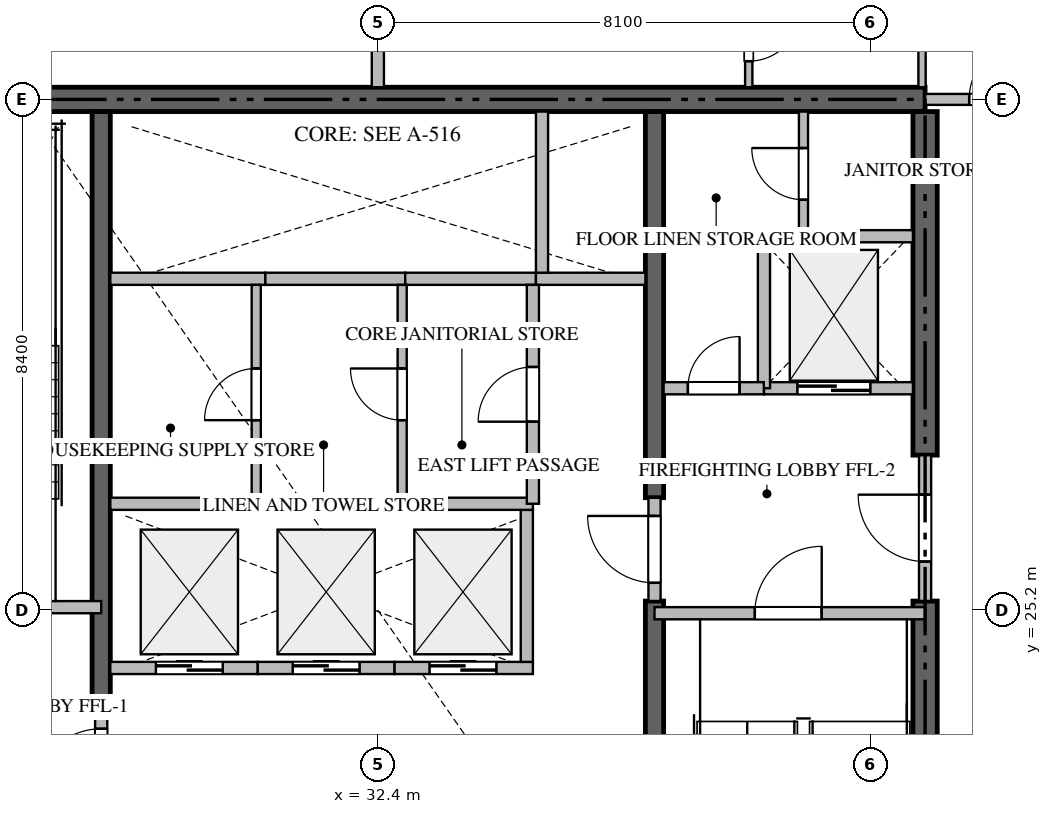
"""IFC4 building model, lengths in metres.
Left out: names, types, materials, properties, quantities, classifications, styles, units other than length and angle.
Written with IfcOpenShell. Run it as: python <this file> out.ifc"""

import sys

from ifc_helpers import new_model, si_unit, direction, frame, frame_2d, origin, place, context, subcontext, project, spatial, rectangle, extrude, source, transform, mapped, element, fill, save


model = new_model("IFC4")
c1 = context("Model", 3, precision=1e-05, world=origin(), true_north=direction((0.0, 1.0)))
c2 = subcontext(c1, "Body", "Model", "MODEL_VIEW")
j1 = project(units=[si_unit("LENGTHUNIT", "METRE"), si_unit("PLANEANGLEUNIT", "RADIAN")], contexts=[c1])
p1 = place(None, origin())
s1 = spatial("IfcSite", under=j1, at=p1, CompositionType="ELEMENT")
p2 = place(p1, origin())
s2 = spatial("IfcBuilding", under=s1, at=p2, CompositionType="ELEMENT")
p3 = place(p2, frame((0.0, 0.0, 120.15)))
s3 = spatial("IfcBuildingStorey", under=s2, at=p3, CompositionType="ELEMENT", Elevation=120.15)
p4 = place(p3, frame((41.4, 33.6, -0.44), z_axis=(0.0, 0.0, 1.0), x_axis=(-1.0, 0.0, 0.0)))
e1 = element("IfcWall", 1, at=p4, inside=s3, PredefinedType="SHEAR", context=c2, shape_type="SweptSolid", body=[
    extrude(rectangle(XDim=18.0, YDim=0.4, at=frame_2d((9.0, 0.0))), origin(), (0.0, 0.0, 1.0), 3.928),
])
p5 = place(p3, frame((41.4, 17.0, -0.44), z_axis=(0.0, 0.0, 1.0), x_axis=(0.0, 1.0, 0.0)))
e2 = element("IfcWall", 2, at=p5, inside=s3, PredefinedType="SHEAR", context=c2, shape_type="SweptSolid", body=[
    extrude(rectangle(XDim=8.35, YDim=0.4, at=frame_2d((4.175, 0.0))), origin(), (0.0, 0.0, 1.0), 3.928),
])
p6 = place(p3, frame((41.4, 27.75, -0.44), z_axis=(0.0, 0.0, 1.0), x_axis=(0.0, 1.0, 0.0)))
e3 = element("IfcWall", 3, at=p6, inside=s3, PredefinedType="SHEAR", context=c2, shape_type="SweptSolid", body=[
    extrude(rectangle(XDim=5.65, YDim=0.4, at=frame_2d((2.825, 0.0))), origin(), (0.0, 0.0, 1.0), 3.928),
])
p7 = place(p3, frame((27.85, 23.55, -0.44), z_axis=(0.0, 0.0, 1.0), x_axis=(0.0, 1.0, 0.0)))
e4 = element("IfcWall", 4, at=p7, inside=s3, PredefinedType="SHEAR", context=c2, shape_type="SweptSolid", body=[
    extrude(rectangle(XDim=9.85, YDim=0.3, at=frame_2d((4.925, 0.0))), origin(), (0.0, 0.0, 1.0), 3.928),
])
p8 = place(p3, frame((36.95, 17.0, -0.44), z_axis=(0.0, 0.0, 1.0), x_axis=(0.0, 1.0, 0.0)))
e5 = element("IfcWall", 5, at=p8, inside=s3, PredefinedType="SHEAR", context=c2, shape_type="SweptSolid", body=[
    extrude(rectangle(XDim=8.35, YDim=0.3, at=frame_2d((4.175, 0.0))), origin(), (0.0, 0.0, 1.0), 3.928),
])
p9 = place(p3, frame((36.95, 27.05, -0.44), z_axis=(0.0, 0.0, 1.0), x_axis=(0.0, 1.0, 0.0)))
e6 = element("IfcWall", 6, at=p9, inside=s3, PredefinedType="SHEAR", context=c2, shape_type="SweptSolid", body=[
    extrude(rectangle(XDim=6.35, YDim=0.3, at=frame_2d((3.175, 0.0))), origin(), (0.0, 0.0, 1.0), 3.928),
])
p10 = place(p3, frame((23.4, 25.25, 0.0), z_axis=(0.0, 0.0, 1.0), x_axis=(1.0, 0.0, 0.0)))
e7 = element("IfcWall", 7, at=p10, inside=s3, PredefinedType="STANDARD", context=c2, shape_type="SweptSolid", body=[
    extrude(rectangle(XDim=4.45, YDim=0.2, at=frame_2d((2.225, 0.0))), origin(), (0.0, 0.0, 1.0), 3.49),
])
p11 = place(p10, frame((1.65, 0.0, 0.0)))
e8 = element("IfcOpeningElement", 8, at=p11, cuts=e7, PredefinedType="OPENING", context=c2, shape_type="SweptSolid", body=[
    extrude(rectangle(XDim=1.1, YDim=2.15, at=frame_2d((0.55, 1.075))), frame((0.0, 0.11, 0.0), z_axis=(0.0, -1.0, 0.0), x_axis=(1.0, 0.0, 0.0)), (0.0, 0.0, 1.0), 0.22),
])
p12 = place(p3, frame((36.95, 25.15, 0.0), z_axis=(0.0, 0.0, 1.0), x_axis=(1.0, 0.0, 0.0)))
e9 = element("IfcWall", 9, at=p12, inside=s3, PredefinedType="STANDARD", context=c2, shape_type="SweptSolid", body=[
    extrude(rectangle(XDim=4.45, YDim=0.2, at=frame_2d((2.225, 0.0))), origin(), (0.0, 0.0, 1.0), 3.49),
])
p13 = place(p12, frame((1.65, 0.0, 0.0)))
e10 = element("IfcOpeningElement", 10, at=p13, cuts=e9, PredefinedType="OPENING", context=c2, shape_type="SweptSolid", body=[
    extrude(rectangle(XDim=1.1, YDim=2.15, at=frame_2d((0.55, 1.075))), frame((0.0, 0.11, 0.0), z_axis=(0.0, -1.0, 0.0), x_axis=(1.0, 0.0, 0.0)), (0.0, 0.0, 1.0), 0.22),
])
p14 = place(p3, frame((38.75, 28.85, 0.0), z_axis=(0.0, 0.0, 1.0), x_axis=(1.0, 0.0, 0.0)))
e11 = element("IfcWall", 11, at=p14, inside=s3, PredefinedType="STANDARD", context=c2, shape_type="SweptSolid", body=[
    extrude(rectangle(XDim=2.45, YDim=0.2, at=frame_2d((1.225, 0.0))), origin(), (0.0, 0.0, 1.0), 3.49),
])
p15 = place(p14, frame((0.55, 0.0, 0.0)))
e12 = element("IfcOpeningElement", 12, at=p15, cuts=e11, PredefinedType="OPENING", context=c2, shape_type="SweptSolid", body=[
    extrude(rectangle(XDim=1.2, YDim=2.2, at=frame_2d((0.6, 1.1))), frame((0.0, 0.11, 0.0), z_axis=(0.0, -1.0, 0.0), x_axis=(1.0, 0.0, 0.0)), (0.0, 0.0, 1.0), 0.22),
])
p16 = place(p3, frame((28.0, 24.25, 0.0), z_axis=(0.0, 0.0, 1.0), x_axis=(1.0, 0.0, 0.0)))
e13 = element("IfcWall", 13, at=p16, inside=s3, PredefinedType="STANDARD", context=c2, shape_type="SweptSolid", body=[
    extrude(rectangle(XDim=2.425, YDim=0.2, at=frame_2d((1.212, 0.0))), origin(), (0.0, 0.0, 1.0), 3.49),
])
p17 = place(p16, frame((0.75, 0.0, 0.0)))
e14 = element("IfcOpeningElement", 14, at=p17, cuts=e13, PredefinedType="OPENING", context=c2, shape_type="SweptSolid", body=[
    extrude(rectangle(XDim=1.1, YDim=2.2, at=frame_2d((0.55, 1.1))), frame((0.0, 0.11, 0.0), z_axis=(0.0, -1.0, 0.0), x_axis=(1.0, 0.0, 0.0)), (0.0, 0.0, 1.0), 0.22),
])
p18 = place(p3, frame((30.425, 24.25, 0.0), z_axis=(0.0, 0.0, 1.0), x_axis=(1.0, 0.0, 0.0)))
e15 = element("IfcWall", 15, at=p18, inside=s3, PredefinedType="STANDARD", context=c2, shape_type="SweptSolid", body=[
    extrude(rectangle(XDim=2.25, YDim=0.2, at=frame_2d((1.125, 0.0))), origin(), (0.0, 0.0, 1.0), 3.49),
])
p19 = place(p18, frame((0.575, 0.0, 0.0)))
e16 = element("IfcOpeningElement", 16, at=p19, cuts=e15, PredefinedType="OPENING", context=c2, shape_type="SweptSolid", body=[
    extrude(rectangle(XDim=1.1, YDim=2.2, at=frame_2d((0.55, 1.1))), frame((0.0, 0.11, 0.0), z_axis=(0.0, -1.0, 0.0), x_axis=(1.0, 0.0, 0.0)), (0.0, 0.0, 1.0), 0.22),
])
p20 = place(p3, frame((32.675, 24.25, 0.0), z_axis=(0.0, 0.0, 1.0), x_axis=(1.0, 0.0, 0.0)))
e17 = element("IfcWall", 17, at=p20, inside=s3, PredefinedType="STANDARD", context=c2, shape_type="SweptSolid", body=[
    extrude(rectangle(XDim=2.275, YDim=0.2, at=frame_2d((1.137, 0.0))), origin(), (0.0, 0.0, 1.0), 3.49),
])
p21 = place(p20, frame((0.575, 0.0, 0.0)))
e18 = element("IfcOpeningElement", 18, at=p21, cuts=e17, PredefinedType="OPENING", context=c2, shape_type="SweptSolid", body=[
    extrude(rectangle(XDim=1.1, YDim=2.2, at=frame_2d((0.55, 1.1))), frame((0.0, 0.11, 0.0), z_axis=(0.0, -1.0, 0.0), x_axis=(1.0, 0.0, 0.0)), (0.0, 0.0, 1.0), 0.22),
])
p22 = place(p3, frame((34.85, 24.35, 0.0), z_axis=(0.0, 0.0, 1.0), x_axis=(0.0, 1.0, 0.0)))
e19 = element("IfcWall", 19, at=p22, inside=s3, PredefinedType="STANDARD", context=c2, shape_type="SweptSolid", body=[
    extrude(rectangle(XDim=2.5, YDim=0.2, at=frame_2d((1.25, 0.0))), origin(), (0.0, 0.0, 1.0), 3.49),
])
p23 = place(p3, frame((28.0, 30.65, 0.0), z_axis=(0.0, 0.0, 1.0), x_axis=(1.0, 0.0, 0.0)))
e20 = element("IfcWall", 20, at=p23, inside=s3, PredefinedType="STANDARD", context=c2, shape_type="SweptSolid", body=[
    extrude(rectangle(XDim=2.55, YDim=0.2, at=frame_2d((1.275, 0.0))), origin(), (0.0, 0.0, 1.0), 3.49),
])
p24 = place(p3, frame((30.55, 30.65, 0.0), z_axis=(0.0, 0.0, 1.0), x_axis=(1.0, 0.0, 0.0)))
e21 = element("IfcWall", 21, at=p24, inside=s3, PredefinedType="STANDARD", context=c2, shape_type="SweptSolid", body=[
    extrude(rectangle(XDim=2.3, YDim=0.2, at=frame_2d((1.15, 0.0))), origin(), (0.0, 0.0, 1.0), 3.49),
])
p25 = place(p3, frame((32.85, 30.65, 0.0), z_axis=(0.0, 0.0, 1.0), x_axis=(1.0, 0.0, 0.0)))
e22 = element("IfcWall", 22, at=p25, inside=s3, PredefinedType="STANDARD", context=c2, shape_type="SweptSolid", body=[
    extrude(rectangle(XDim=2.15, YDim=0.2, at=frame_2d((1.075, 0.0))), origin(), (0.0, 0.0, 1.0), 3.49),
])
p26 = place(p3, frame((35.0, 30.65, 0.0), z_axis=(0.0, 0.0, 1.0), x_axis=(1.0, 0.0, 0.0)))
e23 = element("IfcWall", 23, at=p26, inside=s3, PredefinedType="STANDARD", context=c2, shape_type="SweptSolid", body=[
    extrude(rectangle(XDim=1.8, YDim=0.2, at=frame_2d((0.9, 0.0))), origin(), (0.0, 0.0, 1.0), 3.49),
])
p27 = place(p3, frame((35.1, 30.75, 0.0), z_axis=(0.0, 0.0, 1.0), x_axis=(0.0, 1.0, 0.0)))
e24 = element("IfcWall", 24, at=p27, inside=s3, PredefinedType="STANDARD", context=c2, shape_type="SweptSolid", body=[
    extrude(rectangle(XDim=2.65, YDim=0.2, at=frame_2d((1.325, 0.0))), origin(), (0.0, 0.0, 1.0), 3.49),
])
p28 = place(p3, frame((38.75, 28.85, 0.0), z_axis=(0.0, 0.0, 1.0), x_axis=(0.0, 1.0, 0.0)))
e25 = element("IfcWall", 25, at=p28, inside=s3, PredefinedType="STANDARD", context=c2, shape_type="SweptSolid", body=[
    extrude(rectangle(XDim=2.5, YDim=0.2, at=frame_2d((1.25, 0.0))), origin(), (0.0, 0.0, 1.0), 3.49),
])
p29 = place(p3, frame((38.75, 31.35, 0.0), z_axis=(0.0, 0.0, 1.0), x_axis=(1.0, 0.0, 0.0)))
e26 = element("IfcWall", 26, at=p29, inside=s3, PredefinedType="STANDARD", context=c2, shape_type="SweptSolid", body=[
    extrude(rectangle(XDim=2.45, YDim=0.2, at=frame_2d((1.225, 0.0))), origin(), (0.0, 0.0, 1.0), 3.49),
])
p30 = place(p3, frame((37.1, 28.85, 0.0), z_axis=(0.0, 0.0, 1.0), x_axis=(1.0, 0.0, 0.0)))
e27 = element("IfcWall", 27, at=p30, inside=s3, PredefinedType="STANDARD", context=c2, shape_type="SweptSolid", body=[
    extrude(rectangle(XDim=1.648, YDim=0.2, at=frame_2d((0.824, 0.0))), origin(), (0.0, 0.0, 1.0), 3.49),
])
p31 = place(p30, frame((0.399, 0.0, 0.0)))
e28 = element("IfcOpeningElement", 28, at=p31, cuts=e27, PredefinedType="OPENING", context=c2, shape_type="SweptSolid", body=[
    extrude(rectangle(XDim=0.85, YDim=2.1, at=frame_2d((0.425, 1.05))), frame((0.0, 0.11, 0.0), z_axis=(0.0, -1.0, 0.0), x_axis=(1.0, 0.0, 0.0)), (0.0, 0.0, 1.0), 0.22),
])
p32 = place(p3, frame((41.4, 25.352, 0.0), z_axis=(0.0, 0.0, 1.0), x_axis=(0.0, 1.0, 0.0)))
e29 = element("IfcWall", 29, at=p32, inside=s3, PredefinedType="STANDARD", context=c2, shape_type="SweptSolid", body=[
    extrude(rectangle(XDim=2.396, YDim=0.2, at=frame_2d((1.198, 0.0))), origin(), (0.0, 0.0, 1.0), 3.49),
])
p33 = place(p32, frame((0.648, 0.0, 0.0)))
e30 = element("IfcOpeningElement", 30, at=p33, cuts=e29, PredefinedType="OPENING", context=c2, shape_type="SweptSolid", body=[
    extrude(rectangle(XDim=1.1, YDim=2.15, at=frame_2d((0.55, 1.075))), frame((0.0, 0.11, 0.0), z_axis=(0.0, -1.0, 0.0), x_axis=(1.0, 0.0, 0.0)), (0.0, 0.0, 1.0), 0.22),
])
p34 = place(p3, frame((27.85, 21.852, 0.0), z_axis=(0.0, 0.0, 1.0), x_axis=(0.0, 1.0, 0.0)))
e31 = element("IfcWall", 31, at=p34, inside=s3, PredefinedType="STANDARD", context=c2, shape_type="SweptSolid", body=[
    extrude(rectangle(XDim=1.696, YDim=0.2, at=frame_2d((0.848, 0.0))), origin(), (0.0, 0.0, 1.0), 3.49),
])
p35 = place(p34, frame((0.298, 0.0, 0.0)))
e32 = element("IfcOpeningElement", 32, at=p35, cuts=e31, PredefinedType="OPENING", context=c2, shape_type="SweptSolid", body=[
    extrude(rectangle(XDim=1.1, YDim=2.15, at=frame_2d((0.55, 1.075))), frame((0.0, 0.11, 0.0), z_axis=(0.0, -1.0, 0.0), x_axis=(1.0, 0.0, 0.0)), (0.0, 0.0, 1.0), 0.22),
])
p36 = place(p3, frame((36.95, 25.352, 0.0), z_axis=(0.0, 0.0, 1.0), x_axis=(0.0, 1.0, 0.0)))
e33 = element("IfcWall", 33, at=p36, inside=s3, PredefinedType="STANDARD", context=c2, shape_type="SweptSolid", body=[
    extrude(rectangle(XDim=1.696, YDim=0.2, at=frame_2d((0.848, 0.0))), origin(), (0.0, 0.0, 1.0), 3.49),
])
p37 = place(p36, frame((0.298, 0.0, 0.0)))
e34 = element("IfcOpeningElement", 34, at=p37, cuts=e33, PredefinedType="OPENING", context=c2, shape_type="SweptSolid", body=[
    extrude(rectangle(XDim=1.1, YDim=2.15, at=frame_2d((0.55, 1.075))), frame((0.0, 0.11, 0.0), z_axis=(0.0, -1.0, 0.0), x_axis=(1.0, 0.0, 0.0)), (0.0, 0.0, 1.0), 0.22),
])
p38 = place(p3, frame((28.0, 26.95, 0.0), z_axis=(0.0, 0.0, 1.0), x_axis=(1.0, 0.0, 0.0)))
e35 = element("IfcWall", 35, at=p38, inside=s3, PredefinedType="STANDARD", context=c2, shape_type="SweptSolid", body=[
    extrude(rectangle(XDim=6.95, YDim=0.2, at=frame_2d((3.475, 0.0))), origin(), (0.0, 0.0, 1.0), 3.49),
])
p39 = place(p3, frame((39.4, 31.35, 0.0), z_axis=(0.0, 0.0, 1.0), x_axis=(0.0, 1.0, 0.0)))
e36 = element("IfcWall", 36, at=p39, inside=s3, PredefinedType="PARTITIONING", context=c2, shape_type="SweptSolid", body=[
    extrude(rectangle(XDim=2.05, YDim=0.15, at=frame_2d((1.025, 0.0))), origin(), (0.0, 0.0, 1.0), 3.49),
])
p40 = place(p39, frame((0.6, 0.0, 0.0)))
e37 = element("IfcOpeningElement", 37, at=p40, cuts=e36, PredefinedType="OPENING", context=c2, shape_type="SweptSolid", body=[
    extrude(rectangle(XDim=0.85, YDim=2.1, at=frame_2d((0.425, 1.05))), frame((0.0, 0.085, 0.0), z_axis=(0.0, -1.0, 0.0), x_axis=(1.0, 0.0, 0.0)), (0.0, 0.0, 1.0), 0.17),
])
p41 = place(p3, frame((34.95, 26.95, 0.0), z_axis=(0.0, 0.0, 1.0), x_axis=(0.0, 1.0, 0.0)))
e38 = element("IfcWall", 38, at=p41, inside=s3, PredefinedType="STANDARD", context=c2, shape_type="SweptSolid", body=[
    extrude(rectangle(XDim=3.6, YDim=0.2, at=frame_2d((1.8, 0.0))), origin(), (0.0, 0.0, 1.0), 3.49),
])
p42 = place(p41, frame((1.35, 0.0, 0.0)))
e39 = element("IfcOpeningElement", 39, at=p42, cuts=e38, PredefinedType="OPENING", context=c2, shape_type="SweptSolid", body=[
    extrude(rectangle(XDim=0.9, YDim=2.1, at=frame_2d((0.45, 1.05))), frame((0.0, 0.11, 0.0), z_axis=(0.0, -1.0, 0.0), x_axis=(1.0, 0.0, 0.0)), (0.0, 0.0, 1.0), 0.22),
])
p43 = place(p3, frame((32.8, 26.95, 0.0), z_axis=(0.0, 0.0, 1.0), x_axis=(0.0, 1.0, 0.0)))
e40 = element("IfcWall", 40, at=p43, inside=s3, PredefinedType="PARTITIONING", context=c2, shape_type="SweptSolid", body=[
    extrude(rectangle(XDim=3.6, YDim=0.15, at=frame_2d((1.8, 0.0))), origin(), (0.0, 0.0, 1.0), 3.49),
])
p44 = place(p43, frame((1.375, 0.0, 0.0)))
e41 = element("IfcOpeningElement", 41, at=p44, cuts=e40, PredefinedType="OPENING", context=c2, shape_type="SweptSolid", body=[
    extrude(rectangle(XDim=0.85, YDim=2.1, at=frame_2d((0.425, 1.05))), frame((0.0, 0.085, 0.0), z_axis=(0.0, -1.0, 0.0), x_axis=(1.0, 0.0, 0.0)), (0.0, 0.0, 1.0), 0.17),
])
p45 = place(p3, frame((30.4, 26.95, 0.0), z_axis=(0.0, 0.0, 1.0), x_axis=(0.0, 1.0, 0.0)))
e42 = element("IfcWall", 42, at=p45, inside=s3, PredefinedType="PARTITIONING", context=c2, shape_type="SweptSolid", body=[
    extrude(rectangle(XDim=3.6, YDim=0.15, at=frame_2d((1.8, 0.0))), origin(), (0.0, 0.0, 1.0), 3.49),
])
p46 = place(p45, frame((1.375, 0.0, 0.0)))
e43 = element("IfcOpeningElement", 43, at=p46, cuts=e42, PredefinedType="OPENING", context=c2, shape_type="SweptSolid", body=[
    extrude(rectangle(XDim=0.85, YDim=2.1, at=frame_2d((0.425, 1.05))), frame((0.0, 0.085, 0.0), z_axis=(0.0, -1.0, 0.0), x_axis=(1.0, 0.0, 0.0)), (0.0, 0.0, 1.0), 0.17),
])
p47 = place(p3, frame((32.4, 33.8, 0.0), z_axis=(0.0, 0.0, 1.0), x_axis=(0.0, 1.0, 0.0)))
e44 = element("IfcWall", 44, at=p47, inside=s3, PredefinedType="PARTITIONING", context=c2, shape_type="SweptSolid", body=[
    extrude(rectangle(XDim=15.118, YDim=0.2, at=frame_2d((7.559, 0.0))), origin(), (0.0, 0.0, 1.0), 3.49),
])
p48 = place(p3, frame((41.402, 33.6, 0.0), z_axis=(0.0, 0.0, 1.0), x_axis=(1.0, 0.0, 0.0)))
e45 = element("IfcWall", 45, at=p48, inside=s3, PredefinedType="PARTITIONING", context=c2, shape_type="SweptSolid", body=[
    extrude(rectangle(XDim=2.446, YDim=0.18, at=frame_2d((1.223, 0.0))), origin(), (0.0, 0.0, 1.0), 3.49),
])
p49 = place(p48, frame((0.723, 0.0, 0.0)))
e46 = element("IfcOpeningElement", 46, at=p49, cuts=e45, PredefinedType="OPENING", context=c2, shape_type="SweptSolid", body=[
    extrude(rectangle(XDim=1.0, YDim=2.15, at=frame_2d((0.5, 1.075))), frame((0.0, 0.1, 0.0), z_axis=(0.0, -1.0, 0.0), x_axis=(1.0, 0.0, 0.0)), (0.0, 0.0, 1.0), 0.2),
])
p50 = place(p3, frame((41.35, 36.35, 0.0), z_axis=(0.0, 0.0, 1.0), x_axis=(0.0, -1.0, 0.0)))
e47 = element("IfcWall", 47, at=p50, inside=s3, PredefinedType="PARTITIONING", context=c2, shape_type="SweptSolid", body=[
    extrude(rectangle(XDim=2.55, YDim=0.12, at=frame_2d((1.275, 0.0))), origin(), (0.0, 0.0, 1.0), 3.49),
])
p51 = place(p3, frame((38.5, 35.648, 0.0), z_axis=(0.0, 0.0, 1.0), x_axis=(0.0, -1.0, 0.0)))
e48 = element("IfcWall", 48, at=p51, inside=s3, PredefinedType="PARTITIONING", context=c2, shape_type="SweptSolid", body=[
    extrude(rectangle(XDim=1.848, YDim=0.12, at=frame_2d((0.924, 0.0))), origin(), (0.0, 0.0, 1.0), 3.49),
])
p52 = place(p51, frame((0.569, 0.0, 0.0)))
e49 = element("IfcOpeningElement", 49, at=p52, cuts=e48, PredefinedType="OPENING", context=c2, shape_type="SweptSolid", body=[
    extrude(rectangle(XDim=0.85, YDim=2.1, at=frame_2d((0.425, 1.05))), frame((0.0, 0.07, 0.0), z_axis=(0.0, -1.0, 0.0), x_axis=(1.0, 0.0, 0.0)), (0.0, 0.0, 1.0), 0.14),
])
m1 = source(origin(), c2, "Body", "SweptSolid", [
    extrude(rectangle(XDim=1.1, YDim=2.15, at=frame_2d((0.55, 1.075))), frame((0.0, 0.025, 0.0), z_axis=(0.0, -1.0, 0.0), x_axis=(1.0, 0.0, 0.0)), (0.0, 0.0, 1.0), 0.05),
])
p53 = place(p13, origin())
e50 = element("IfcDoor", 50, at=p53, inside=s3, OperationType="SINGLE_SWING_RIGHT", PredefinedType="DOOR", context=c2, shape_type="MappedRepresentation", body=[
    mapped(m1, transform((0.0, 0.0, 0.0), scale=1.0)),
])
fill(e10, e50)
m2 = source(origin(), c2, "Body", "SweptSolid", [
    extrude(rectangle(XDim=1.2, YDim=2.2, at=frame_2d((0.6, 1.1))), frame((0.0, 0.025, 0.0), z_axis=(0.0, -1.0, 0.0), x_axis=(1.0, 0.0, 0.0)), (0.0, 0.0, 1.0), 0.05),
])
p54 = place(p15, origin())
e51 = element("IfcDoor", 51, at=p54, inside=s3, OperationType="DOUBLE_DOOR_SLIDING", PredefinedType="DOOR", context=c2, shape_type="MappedRepresentation", body=[
    mapped(m2, transform((0.0, 0.0, 0.0), scale=1.0)),
])
fill(e12, e51)
m3 = source(origin(), c2, "Body", "SweptSolid", [
    extrude(rectangle(XDim=1.1, YDim=2.2, at=frame_2d((0.55, 1.1))), frame((0.0, 0.025, 0.0), z_axis=(0.0, -1.0, 0.0), x_axis=(1.0, 0.0, 0.0)), (0.0, 0.0, 1.0), 0.05),
])
p55 = place(p17, origin())
e52 = element("IfcDoor", 52, at=p55, inside=s3, OperationType="DOUBLE_DOOR_SLIDING", PredefinedType="DOOR", context=c2, shape_type="MappedRepresentation", body=[
    mapped(m3, transform((0.0, 0.0, 0.0), scale=1.0)),
])
fill(e14, e52)
p56 = place(p19, origin())
e53 = element("IfcDoor", 53, at=p56, inside=s3, OperationType="DOUBLE_DOOR_SLIDING", PredefinedType="DOOR", context=c2, shape_type="MappedRepresentation", body=[
    mapped(m3, transform((0.0, 0.0, 0.0), scale=1.0)),
])
fill(e16, e53)
p57 = place(p21, origin())
e54 = element("IfcDoor", 54, at=p57, inside=s3, OperationType="DOUBLE_DOOR_SLIDING", PredefinedType="DOOR", context=c2, shape_type="MappedRepresentation", body=[
    mapped(m3, transform((0.0, 0.0, 0.0), scale=1.0)),
])
fill(e18, e54)
m4 = source(origin(), c2, "Body", "SweptSolid", [
    extrude(rectangle(XDim=0.85, YDim=2.1, at=frame_2d((0.425, 1.05))), frame((0.0, 0.025, 0.0), z_axis=(0.0, -1.0, 0.0), x_axis=(1.0, 0.0, 0.0)), (0.0, 0.0, 1.0), 0.05),
])
p58 = place(p31, origin())
e55 = element("IfcDoor", 55, at=p58, inside=s3, OperationType="SINGLE_SWING_RIGHT", PredefinedType="DOOR", context=c2, shape_type="MappedRepresentation", body=[
    mapped(m4, transform((0.0, 0.0, 0.0), scale=1.0)),
])
fill(e28, e55)
p59 = place(p33, origin())
e56 = element("IfcDoor", 56, at=p59, inside=s3, OperationType="SINGLE_SWING_RIGHT", PredefinedType="DOOR", context=c2, shape_type="MappedRepresentation", body=[
    mapped(m1, transform((0.0, 0.0, 0.0), scale=1.0)),
])
fill(e30, e56)
p60 = place(p35, origin())
e57 = element("IfcDoor", 57, at=p60, inside=s3, OperationType="SINGLE_SWING_LEFT", PredefinedType="DOOR", context=c2, shape_type="MappedRepresentation", body=[
    mapped(m1, transform((0.0, 0.0, 0.0), scale=1.0)),
])
fill(e32, e57)
p61 = place(p37, origin())
e58 = element("IfcDoor", 58, at=p61, inside=s3, OperationType="SINGLE_SWING_RIGHT", PredefinedType="DOOR", context=c2, shape_type="MappedRepresentation", body=[
    mapped(m1, transform((0.0, 0.0, 0.0), scale=1.0)),
])
fill(e34, e58)
p62 = place(p40, origin())
e59 = element("IfcDoor", 59, at=p62, inside=s3, OperationType="SINGLE_SWING_RIGHT", PredefinedType="DOOR", context=c2, shape_type="MappedRepresentation", body=[
    mapped(m4, transform((0.0, 0.0, 0.0), scale=1.0)),
])
fill(e37, e59)
m5 = source(origin(), c2, "Body", "SweptSolid", [
    extrude(rectangle(XDim=0.9, YDim=2.1, at=frame_2d((0.45, 1.05))), frame((0.0, 0.025, 0.0), z_axis=(0.0, -1.0, 0.0), x_axis=(1.0, 0.0, 0.0)), (0.0, 0.0, 1.0), 0.05),
])
p63 = place(p42, origin())
e60 = element("IfcDoor", 60, at=p63, inside=s3, OperationType="SINGLE_SWING_LEFT", PredefinedType="DOOR", context=c2, shape_type="MappedRepresentation", body=[
    mapped(m5, transform((0.0, 0.0, 0.0), scale=1.0)),
])
fill(e39, e60)
p64 = place(p44, origin())
e61 = element("IfcDoor", 61, at=p64, inside=s3, OperationType="SINGLE_SWING_RIGHT", PredefinedType="DOOR", context=c2, shape_type="MappedRepresentation", body=[
    mapped(m4, transform((0.0, 0.0, 0.0), scale=1.0)),
])
fill(e41, e61)
p65 = place(p46, origin())
e62 = element("IfcDoor", 62, at=p65, inside=s3, OperationType="SINGLE_SWING_LEFT", PredefinedType="DOOR", context=c2, shape_type="MappedRepresentation", body=[
    mapped(m4, transform((0.0, 0.0, 0.0), scale=1.0)),
])
fill(e43, e62)
m6 = source(origin(), c2, "Body", "SweptSolid", [
    extrude(rectangle(XDim=1.0, YDim=2.15, at=frame_2d((0.5, 1.075))), frame((0.0, 0.025, 0.0), z_axis=(0.0, -1.0, 0.0), x_axis=(1.0, 0.0, 0.0)), (0.0, 0.0, 1.0), 0.05),
])
p66 = place(p49, origin())
e63 = element("IfcDoor", 63, at=p66, inside=s3, OperationType="SINGLE_SWING_RIGHT", PredefinedType="DOOR", context=c2, shape_type="MappedRepresentation", body=[
    mapped(m6, transform((0.0, 0.0, 0.0), scale=1.0)),
])
fill(e46, e63)
p67 = place(p52, origin())
e64 = element("IfcDoor", 64, at=p67, inside=s3, OperationType="SINGLE_SWING_LEFT", PredefinedType="DOOR", context=c2, shape_type="MappedRepresentation", body=[
    mapped(m4, transform((0.0, 0.0, 0.0), scale=1.0)),
])
fill(e49, e64)
save(model, sys.argv[1])
